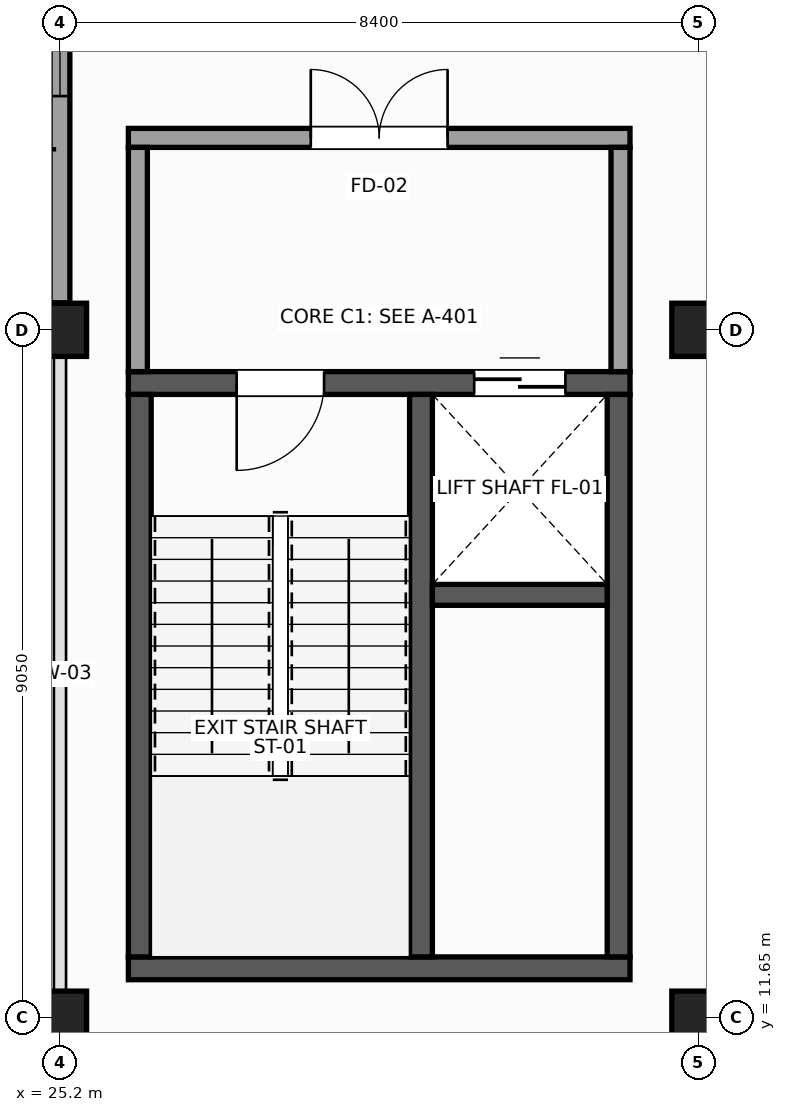
"""IFC4 building model, lengths in metres.
Left out: names, types, materials, properties, quantities, classifications, styles, units other than length and angle.
Written with IfcOpenShell. Run it as: python <this file> out.ifc"""

import sys

from ifc_helpers import new_model, si_unit, direction, frame, frame_2d, origin, origin_2d, place, context, subcontext, project, spatial, rectangle, extrude, element, fill, save


model = new_model("IFC4")
c1 = context("Model", 3, precision=1e-05, world=origin(), true_north=direction((0.0, 1.0)))
c2 = subcontext(c1, "Body", "Model", "MODEL_VIEW")
j1 = project(units=[si_unit("LENGTHUNIT", "METRE"), si_unit("PLANEANGLEUNIT", "RADIAN")], contexts=[c1])
p1 = place(None, origin())
s1 = spatial("IfcSite", under=j1, at=p1, CompositionType="ELEMENT")
p2 = place(p1, origin())
s2 = spatial("IfcBuilding", under=s1, at=p2, CompositionType="ELEMENT")
p3 = place(p2, frame((0.0, 0.0, 10.8)))
s3 = spatial("IfcBuildingStorey", under=s2, at=p3, CompositionType="ELEMENT", Elevation=10.8)
for number, where, z_axis, x_axis in (
    (1, (25.2, 11.65, 0.0), (0.0, 0.0, 1.0), (1.0, 0.0, 0.0)),
    (2, (25.2, 20.7, 0.0), (0.0, 0.0, 1.0), (1.0, 0.0, 0.0)),
    (3, (33.6, 11.65, 0.0), (0.0, 0.0, 1.0), (1.0, 0.0, 0.0)),
    (4, (33.6, 20.7, 0.0), (0.0, 0.0, 1.0), (1.0, 0.0, 0.0)),
):
    element("IfcColumn", number, at=place(p3, frame(where, z_axis=z_axis, x_axis=x_axis)), inside=s3, PredefinedType="COLUMN", context=c2, shape_type="SweptSolid", body=[
        extrude(rectangle(XDim=0.7, YDim=0.7, at=origin_2d()), origin(), (0.0, 0.0, 1.0), 4.8),
    ])
p4 = place(p3, frame((25.2, 29.395, 0.0), z_axis=(0.0, 0.0, 1.0), x_axis=(0.0, -1.0, 0.0)))
e5 = element("IfcWall", 5, at=p4, inside=s3, PredefinedType="STANDARD", context=c2, shape_type="SweptSolid", body=[
    extrude(rectangle(XDim=8.34, YDim=0.26, at=frame_2d((4.17, 0.0))), origin(), (0.0, 0.0, 1.0), 4.5),
])
p5 = place(p4, frame((2.72, 0.0, 0.95)))
e6 = element("IfcOpeningElement", 6, at=p5, cuts=e5, PredefinedType="OPENING", context=c2, shape_type="SweptSolid", body=[
    extrude(rectangle(XDim=2.9, YDim=1.9, at=frame_2d((1.45, 0.95))), frame((0.0, 0.14, 0.0), z_axis=(0.0, -1.0, 0.0), x_axis=(1.0, 0.0, 0.0)), (0.0, 0.0, 1.0), 0.28),
])
p6 = place(p3, frame((26.1, 12.3, 0.0), z_axis=(0.0, 0.0, 1.0), x_axis=(1.0, 0.0, 0.0)))
e7 = element("IfcWall", 7, at=p6, inside=s3, PredefinedType="SHEAR", context=c2, shape_type="SweptSolid", body=[
    extrude(rectangle(XDim=6.6, YDim=0.3, at=frame_2d((3.3, 0.0))), origin(), (0.0, 0.0, 1.0), 4.5),
])
p7 = place(p3, frame((26.1, 20.0, 0.0), z_axis=(0.0, 0.0, 1.0), x_axis=(1.0, 0.0, 0.0)))
e8 = element("IfcWall", 8, at=p7, inside=s3, PredefinedType="SHEAR", context=c2, shape_type="SweptSolid", body=[
    extrude(rectangle(XDim=6.6, YDim=0.3, at=frame_2d((3.3, 0.0))), origin(), (0.0, 0.0, 1.0), 4.5),
])
p8 = place(p7, frame((1.425, 0.0, 0.0)))
e9 = element("IfcOpeningElement", 9, at=p8, cuts=e8, PredefinedType="OPENING", context=c2, shape_type="SweptSolid", body=[
    extrude(rectangle(XDim=1.15, YDim=2.2, at=frame_2d((0.575, 1.1))), frame((0.0, 0.16, 0.0), z_axis=(0.0, -1.0, 0.0), x_axis=(1.0, 0.0, 0.0)), (0.0, 0.0, 1.0), 0.32),
])
p9 = place(p7, frame((4.55, 0.0, 0.0)))
e10 = element("IfcOpeningElement", 10, at=p9, cuts=e8, PredefinedType="OPENING", context=c2, shape_type="SweptSolid", body=[
    extrude(rectangle(XDim=1.2, YDim=2.15, at=frame_2d((0.6, 1.075))), frame((0.0, 0.16, 0.0), z_axis=(0.0, -1.0, 0.0), x_axis=(1.0, 0.0, 0.0)), (0.0, 0.0, 1.0), 0.32),
])
for number, where, z_axis, x_axis in (
    (11, (26.25, 12.45, 0.0), (0.0, 0.0, 1.0), (0.0, 1.0, 0.0)),
    (12, (32.55, 12.45, 0.0), (0.0, 0.0, 1.0), (0.0, 1.0, 0.0)),
    (13, (29.95, 12.45, 0.0), (0.0, 0.0, 1.0), (0.0, 1.0, 0.0)),
):
    element("IfcWall", number, at=place(p3, frame(where, z_axis=z_axis, x_axis=x_axis)), inside=s3, PredefinedType="SHEAR", context=c2, shape_type="SweptSolid", body=[
        extrude(rectangle(XDim=7.4, YDim=0.3, at=frame_2d((3.7, 0.0))), origin(), (0.0, 0.0, 1.0), 4.5),
    ])
p10 = place(p3, frame((30.1, 17.213, 0.0), z_axis=(0.0, 0.0, 1.0), x_axis=(1.0, 0.0, 0.0)))
e14 = element("IfcWall", 14, at=p10, inside=s3, PredefinedType="SHEAR", context=c2, shape_type="SweptSolid", body=[
    extrude(rectangle(XDim=2.3, YDim=0.275, at=frame_2d((1.15, 0.0))), origin(), (0.0, 0.0, 1.0), 4.5),
])
p11 = place(p3, frame((26.1, 23.225, 0.0), z_axis=(0.0, 0.0, 1.0), x_axis=(1.0, 0.0, 0.0)))
e15 = element("IfcWall", 15, at=p11, inside=s3, PredefinedType="PARTITIONING", context=c2, shape_type="SweptSolid", body=[
    extrude(rectangle(XDim=6.6, YDim=0.25, at=frame_2d((3.3, 0.0))), origin(), (0.0, 0.0, 1.0), 4.5),
])
p12 = place(p11, frame((2.4, 0.0, 0.0)))
e16 = element("IfcOpeningElement", 16, at=p12, cuts=e15, PredefinedType="OPENING", context=c2, shape_type="SweptSolid", body=[
    extrude(rectangle(XDim=1.8, YDim=2.25, at=frame_2d((0.9, 1.125))), frame((0.0, 0.135, 0.0), z_axis=(0.0, -1.0, 0.0), x_axis=(1.0, 0.0, 0.0)), (0.0, 0.0, 1.0), 0.27),
])
for number, where, z_axis, x_axis in (
    (17, (26.225, 20.15, 0.0), (0.0, 0.0, 1.0), (0.0, 1.0, 0.0)),
    (18, (32.575, 20.15, 0.0), (0.0, 0.0, 1.0), (0.0, 1.0, 0.0)),
):
    element("IfcWall", number, at=place(p3, frame(where, z_axis=z_axis, x_axis=x_axis)), inside=s3, PredefinedType="PARTITIONING", context=c2, shape_type="SweptSolid", body=[
        extrude(rectangle(XDim=2.95, YDim=0.25, at=frame_2d((1.475, 0.0))), origin(), (0.0, 0.0, 1.0), 3.73),
    ])
p13 = place(p5, origin())
e19 = element("IfcWindow", 19, at=p13, inside=s3, PartitioningType="SINGLE_PANEL", PredefinedType="WINDOW", context=c2, shape_type="SweptSolid", body=[
    extrude(rectangle(XDim=2.9, YDim=1.9, at=frame_2d((1.45, 0.95))), frame((0.0, 0.03, 0.0), z_axis=(0.0, -1.0, 0.0), x_axis=(1.0, 0.0, 0.0)), (0.0, 0.0, 1.0), 0.06),
])
fill(e6, e19)
p14 = place(p8, frame((1.15, 0.0, 0.0), z_axis=(0.0, 0.0, 1.0), x_axis=(-1.0, 0.0, 0.0)))
e20 = element("IfcDoor", 20, at=p14, inside=s3, OperationType="SINGLE_SWING_RIGHT", PredefinedType="DOOR", context=c2, shape_type="SweptSolid", body=[
    extrude(rectangle(XDim=1.15, YDim=2.2, at=frame_2d((0.575, 1.1))), frame((0.0, 0.025, 0.0), z_axis=(0.0, -1.0, 0.0), x_axis=(1.0, 0.0, 0.0)), (0.0, 0.0, 1.0), 0.05),
])
fill(e9, e20)
p15 = place(p9, origin())
e21 = element("IfcDoor", 21, at=p15, inside=s3, OperationType="DOUBLE_DOOR_SLIDING", PredefinedType="DOOR", context=c2, shape_type="SweptSolid", body=[
    extrude(rectangle(XDim=1.2, YDim=2.15, at=frame_2d((0.6, 1.075))), frame((0.0, 0.025, 0.0), z_axis=(0.0, -1.0, 0.0), x_axis=(1.0, 0.0, 0.0)), (0.0, 0.0, 1.0), 0.05),
])
fill(e10, e21)
p16 = place(p12, origin())
e22 = element("IfcDoor", 22, at=p16, inside=s3, OperationType="DOUBLE_DOOR_SINGLE_SWING", PredefinedType="DOOR", context=c2, shape_type="SweptSolid", body=[
    extrude(rectangle(XDim=1.8, YDim=2.25, at=frame_2d((0.9, 1.125))), frame((0.0, 0.025, 0.0), z_axis=(0.0, -1.0, 0.0), x_axis=(1.0, 0.0, 0.0)), (0.0, 0.0, 1.0), 0.05),
])
fill(e16, e22)
save(model, sys.argv[1])
